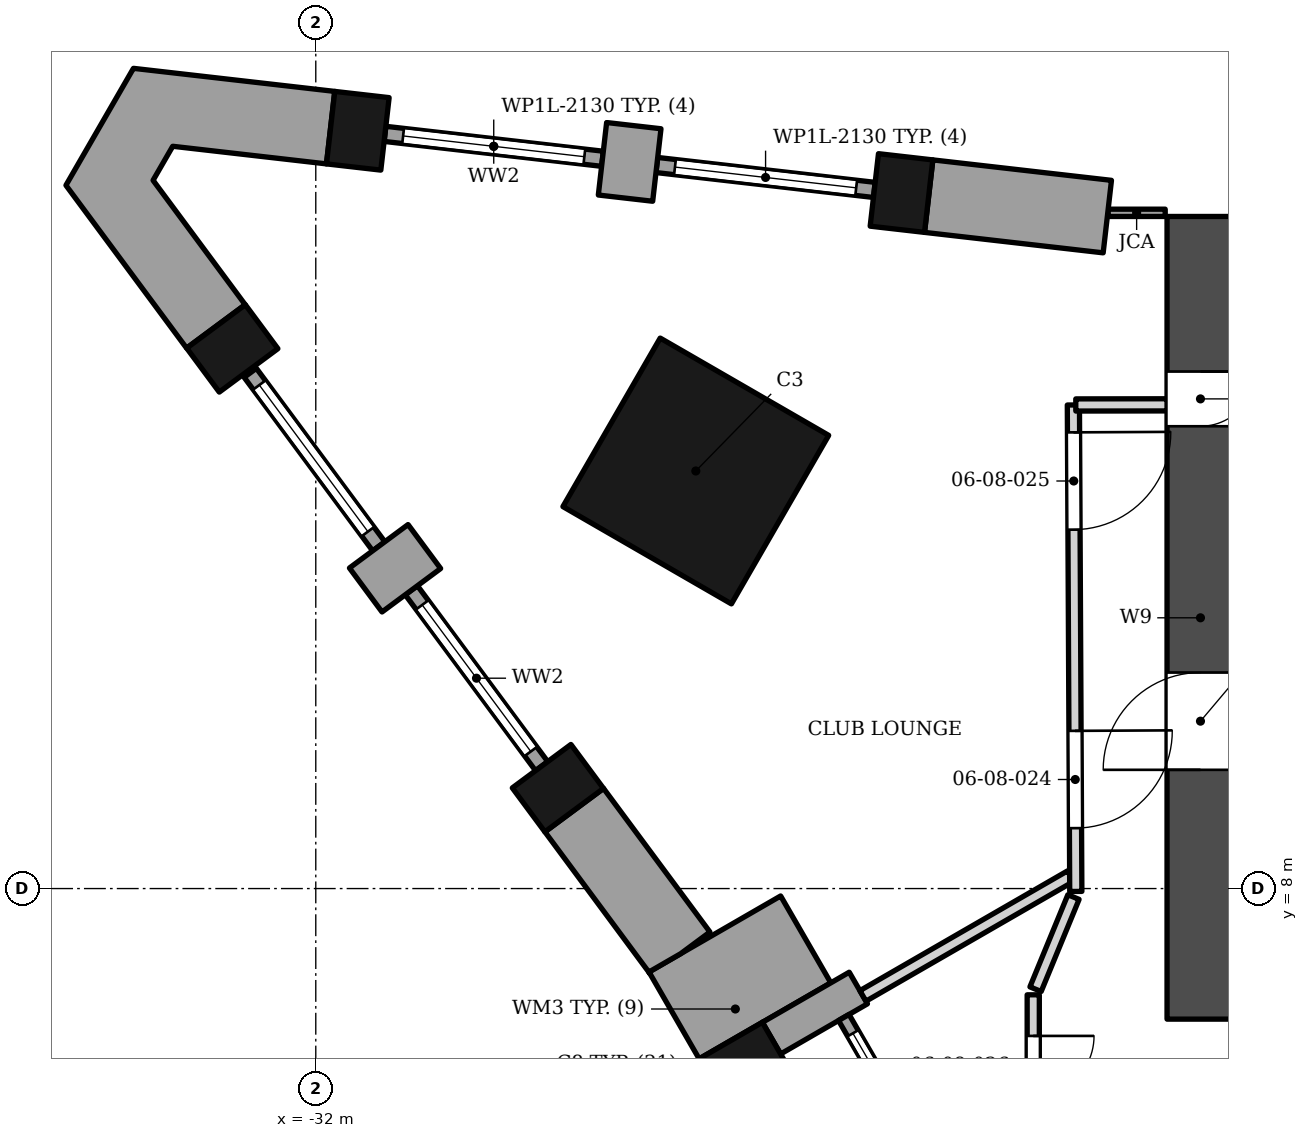
"""IFC4 building model, lengths in metres.
Left out: names, types, materials, properties, quantities, classifications, styles, units other than length and angle.
Written with IfcOpenShell. Run it as: python <this file> out.ifc"""

import sys

from ifc_helpers import new_model, si_unit, direction, frame, frame_2d, origin, origin_2d, place, context, subcontext, project, spatial, polyline, rectangle, outline, extrude, element, fill, save


model = new_model("IFC4")
c1 = context("Model", 3, precision=1e-05, world=origin(), true_north=direction((0.0, 1.0)))
c2 = subcontext(c1, "Body", "Model", "MODEL_VIEW")
j1 = project(units=[si_unit("LENGTHUNIT", "METRE"), si_unit("PLANEANGLEUNIT", "RADIAN")], contexts=[c1])
p1 = place(None, origin())
s1 = spatial("IfcSite", under=j1, at=p1, CompositionType="ELEMENT")
p2 = place(p1, origin())
s2 = spatial("IfcBuilding", under=s1, at=p2, CompositionType="ELEMENT")
p3 = place(p2, frame((0.0, 0.0, 46.0)))
s3 = spatial("IfcBuildingStorey", under=s2, at=p3, CompositionType="ELEMENT", Elevation=46.0)
p4 = place(p3, frame((-17.45, 5.853, 0.0), z_axis=(0.0, 0.0, 1.0), x_axis=(0.0, 1.0, 0.0)))
e1 = element("IfcWall", 1, at=p4, inside=s3, PredefinedType="SHEAR", context=c2, shape_type="SweptSolid", body=[
    extrude(rectangle(XDim=13.2, YDim=1.1, at=frame_2d((6.6, 0.0))), origin(), (0.0, 0.0, 1.0), 3.4),
])
p5 = place(p4, frame((4.1, 0.0, 0.0)))
e2 = element("IfcOpeningElement", 2, at=p5, cuts=e1, PredefinedType="OPENING", context=c2, shape_type="SweptSolid", body=[
    extrude(rectangle(XDim=1.6, YDim=2.1, at=frame_2d((0.8, 1.05))), frame((0.0, 0.56, 0.0), z_axis=(0.0, -1.0, 0.0), x_axis=(1.0, 0.0, 0.0)), (0.0, 0.0, 1.0), 1.12),
])
p6 = place(p4, frame((9.75, 0.0, 0.0)))
e3 = element("IfcOpeningElement", 3, at=p6, cuts=e1, PredefinedType="OPENING", context=c2, shape_type="SweptSolid", body=[
    extrude(rectangle(XDim=0.9, YDim=2.1, at=frame_2d((0.45, 1.05))), frame((0.0, 0.56, 0.0), z_axis=(0.0, -1.0, 0.0), x_axis=(1.0, 0.0, 0.0)), (0.0, 0.0, 1.0), 1.12),
])
p7 = place(p3, frame((-25.75, 14.867, 0.0), z_axis=(0.0, 0.0, 1.0), x_axis=(0.866025386331, -0.50000003023, 0.0)))
e4 = element("IfcColumn", 4, at=p7, inside=s3, PredefinedType="COLUMN", context=c2, shape_type="SweptSolid", body=[
    extrude(rectangle(XDim=3.2, YDim=3.2, at=origin_2d()), origin(), (0.0, 0.0, 1.0), 3.4),
])
for number, where, z_axis, x_axis in (
    (5, (-24.95, 5.11, 0.0), (0.0, 0.0, 1.0), (0.5, -0.866, 0.0)),
    (6, (-22.367, 19.438, 0.0), (0.0, 0.0, 1.0), (-0.994, 0.114, 0.0)),
    (7, (-31.309, 20.462, 0.0), (0.0, 0.0, 1.0), (-0.994, 0.114, 0.0)),
    (8, (-33.373, 16.883, 0.0), (0.0, 0.0, 1.0), (0.595, -0.804, 0.0)),
    (9, (-28.018, 9.651, 0.0), (0.0, 0.0, 1.0), (0.595, -0.804, 0.0)),
):
    element("IfcColumn", number, at=place(p3, frame(where, z_axis=z_axis, x_axis=x_axis)), inside=s3, PredefinedType="COLUMN", context=c2, shape_type="SweptSolid", body=[
        extrude(rectangle(XDim=0.9, YDim=1.2, at=origin_2d()), origin(), (0.0, 0.0, 1.0), 3.4),
    ])
p8 = place(p3, frame((-24.505, 5.54, 0.0), z_axis=(0.0, 0.0, 1.0), x_axis=(0.866003217194, 0.500038426333, 0.0)))
e10 = element("IfcWall", 10, at=p8, inside=s3, PredefinedType="SOLIDWALL", context=c2, shape_type="SweptSolid", body=[
    extrude(rectangle(XDim=1.65, YDim=0.6, at=frame_2d((0.825, 0.0))), origin(), (0.0, 0.0, 1.0), 2.45),
])
p9 = place(p3, frame((-23.316, 5.88, 0.0), z_axis=(0.0, 0.0, 1.0), x_axis=(0.500027713859, -0.866009402589, 0.0)))
e11 = element("IfcWall", 11, at=p9, inside=s3, PredefinedType="ELEMENTEDWALL", context=c2, shape_type="SweptSolid", body=[
    extrude(rectangle(XDim=4.2, YDim=0.2, at=frame_2d((2.1, 0.0))), origin(), (0.0, 0.0, 1.0), 2.45),
])
p10 = place(p9, frame((0.3, 0.0, 0.6)))
e12 = element("IfcOpeningElement", 12, at=p10, cuts=e11, PredefinedType="OPENING", context=c2, shape_type="SweptSolid", body=[
    extrude(rectangle(XDim=2.1, YDim=1.75, at=frame_2d((1.05, 0.875))), frame((0.0, 0.11, 0.0), z_axis=(0.0, -1.0, 0.0), x_axis=(1.0, 0.0, 0.0)), (0.0, 0.0, 1.0), 0.22),
])
p11 = place(p9, frame((2.7, 0.0, 0.0)))
e13 = element("IfcOpeningElement", 13, at=p11, cuts=e11, PredefinedType="OPENING", context=c2, shape_type="SweptSolid", body=[
    extrude(rectangle(XDim=1.2, YDim=2.35, at=frame_2d((0.6, 1.175))), frame((0.0, 0.11, 0.0), z_axis=(0.0, -1.0, 0.0), x_axis=(1.0, 0.0, 0.0)), (0.0, 0.0, 1.0), 0.22),
])
p12 = place(p3, origin())
e14 = element("IfcWall", 14, at=p12, inside=s3, PredefinedType="SOLIDWALL", context=c2, shape_type="SweptSolid", body=[
    extrude(outline(polyline([(-25.695, 5.2), (-24.655, 5.8), (-24.655, 5.799), (-23.53, 6.449), (-24.354, 7.878), (-26.52, 6.628), (-25.695, 5.199), (-25.694, 5.199), (-25.695, 5.2)])), origin(), (0.0, 0.0, 1.0), 2.63),
])
p13 = place(p3, frame((-26.906, 19.354, 0.0), z_axis=(0.0, 0.0, 1.0), x_axis=(0.113936776845, 0.993488002385, 0.0)))
e15 = element("IfcWall", 15, at=p13, inside=s3, PredefinedType="SOLIDWALL", context=c2, shape_type="SweptSolid", body=[
    extrude(rectangle(XDim=1.2, YDim=0.9, at=frame_2d((0.6, 0.0))), origin(), (0.0, 0.0, 1.0), 2.63),
])
p14 = place(p3, frame((-22.814, 19.489, 0.0), z_axis=(0.0, 0.0, 1.0), x_axis=(-0.993504225498, 0.113795228013, 0.0)))
e16 = element("IfcWall", 16, at=p14, inside=s3, PredefinedType="ELEMENTEDWALL", context=c2, shape_type="SweptSolid", body=[
    extrude(rectangle(XDim=3.6, YDim=0.25, at=frame_2d((1.8, 0.0))), origin(), (0.0, 0.0, 1.0), 2.63),
])
p15 = place(p14, frame((0.3, 0.0, 0.3)))
e17 = element("IfcOpeningElement", 17, at=p15, cuts=e16, PredefinedType="OPENING", context=c2, shape_type="SweptSolid", body=[
    extrude(rectangle(XDim=3.0, YDim=2.13, at=frame_2d((1.5, 1.065))), frame((0.0, 0.135, 0.0), z_axis=(0.0, -1.0, 0.0), x_axis=(1.0, 0.0, 0.0)), (0.0, 0.0, 1.0), 0.27),
])
p16 = place(p3, frame((-27.285, 20.001, 0.0), z_axis=(0.0, 0.0, 1.0), x_axis=(-0.993511890309, 0.113728289423, 0.0)))
e18 = element("IfcWall", 18, at=p16, inside=s3, PredefinedType="ELEMENTEDWALL", context=c2, shape_type="SweptSolid", body=[
    extrude(rectangle(XDim=3.6, YDim=0.25, at=frame_2d((1.8, 0.0))), origin(), (0.0, 0.0, 1.0), 2.63),
])
p17 = place(p16, frame((0.3, 0.0, 0.3)))
e19 = element("IfcOpeningElement", 19, at=p17, cuts=e18, PredefinedType="OPENING", context=c2, shape_type="SweptSolid", body=[
    extrude(rectangle(XDim=3.0, YDim=2.13, at=frame_2d((1.5, 1.065))), frame((0.0, 0.135, 0.0), z_axis=(0.0, -1.0, 0.0), x_axis=(1.0, 0.0, 0.0)), (0.0, 0.0, 1.0), 0.27),
])
p18 = place(p3, frame((-31.178, 12.91, 0.0), z_axis=(0.0, 0.0, 1.0), x_axis=(0.803549985832, 0.595237280644, 0.0)))
e20 = element("IfcWall", 20, at=p18, inside=s3, PredefinedType="SOLIDWALL", context=c2, shape_type="SweptSolid", body=[
    extrude(rectangle(XDim=1.2, YDim=0.9, at=frame_2d((0.6, 0.0))), origin(), (0.0, 0.0, 1.0), 2.63),
])
p19 = place(p3, frame((-33.077, 16.481, 0.0), z_axis=(0.0, 0.0, 1.0), x_axis=(0.595304805086, -0.803499962067, 0.0)))
e21 = element("IfcWall", 21, at=p19, inside=s3, PredefinedType="ELEMENTEDWALL", context=c2, shape_type="SweptSolid", body=[
    extrude(rectangle(XDim=3.552, YDim=0.25, at=frame_2d((1.776, 0.0))), origin(), (0.0, 0.0, 1.0), 2.63),
])
p20 = place(p19, frame((0.25, 0.0, 0.3)))
e22 = element("IfcOpeningElement", 22, at=p20, cuts=e21, PredefinedType="OPENING", context=c2, shape_type="SweptSolid", body=[
    extrude(rectangle(XDim=3.0, YDim=2.13, at=frame_2d((1.5, 1.065))), frame((0.0, 0.135, 0.0), z_axis=(0.0, -1.0, 0.0), x_axis=(1.0, 0.0, 0.0)), (0.0, 0.0, 1.0), 0.27),
])
p21 = place(p3, frame((-30.428, 12.906, 0.0), z_axis=(0.0, 0.0, 1.0), x_axis=(0.595302153335, -0.803501926715, 0.0)))
e23 = element("IfcWall", 23, at=p21, inside=s3, PredefinedType="ELEMENTEDWALL", context=c2, shape_type="SweptSolid", body=[
    extrude(rectangle(XDim=3.6, YDim=0.25, at=frame_2d((1.8, 0.0))), origin(), (0.0, 0.0, 1.0), 2.63),
])
p22 = place(p21, frame((0.3, 0.0, 0.3)))
e24 = element("IfcOpeningElement", 24, at=p22, cuts=e23, PredefinedType="OPENING", context=c2, shape_type="SweptSolid", body=[
    extrude(rectangle(XDim=3.0, YDim=2.13, at=frame_2d((1.5, 1.065))), frame((0.0, 0.135, 0.0), z_axis=(0.0, -1.0, 0.0), x_axis=(1.0, 0.0, 0.0)), (0.0, 0.0, 1.0), 0.27),
])
p23 = place(p3, frame((-21.92, 19.387, 0.0), z_axis=(0.0, 0.0, 1.0), x_axis=(0.993507634887, -0.113765457942, 0.0)))
e25 = element("IfcWall", 25, at=p23, inside=s3, PredefinedType="SOLIDWALL", context=c2, shape_type="SweptSolid", body=[
    extrude(rectangle(XDim=2.957, YDim=1.2, at=frame_2d((1.479, 0.0))), origin(), (0.0, 0.0, 1.0), 2.65),
])
p24 = place(p3, origin())
e26 = element("IfcWall", 26, at=p24, inside=s3, PredefinedType="SOLIDWALL", context=c2, shape_type="SweptSolid", body=[
    extrude(outline(polyline([(-31.688, 21.109), (-34.999, 21.489), (-36.109, 19.565), (-34.125, 16.887), (-33.161, 17.602), (-34.676, 19.647), (-34.353, 20.207), (-31.824, 19.917), (-31.688, 21.109)])), origin(), (0.0, 0.0, 1.0), 2.65),
])
p25 = place(p3, origin())
e27 = element("IfcWall", 27, at=p25, inside=s3, PredefinedType="SOLIDWALL", context=c2, shape_type="SweptSolid", body=[
    extrude(outline(polyline([(-25.518, 7.285), (-27.268, 9.647), (-27.268, 9.647), (-27.268, 9.646), (-28.232, 8.933), (-26.502, 6.599), (-26.52, 6.628), (-26.0, 6.928), (-25.518, 7.285)])), origin(), (0.0, 0.0, 1.0), 2.63),
])
p26 = place(p3, frame((-18.97, 19.113, 0.0), z_axis=(0.0, 0.0, 1.0), x_axis=(1.0, 0.0, 0.0)))
e28 = element("IfcWall", 28, at=p26, inside=s3, PredefinedType="SOLIDWALL", context=c2, shape_type="SweptSolid", body=[
    extrude(rectangle(XDim=0.94, YDim=0.12, at=frame_2d((0.47, 0.0))), origin(), (0.0, 0.0, 1.0), 2.65),
])
p27 = place(p3, frame((-23.001, 6.234, 0.0), z_axis=(0.0, 0.0, 1.0), x_axis=(0.866230957978, 0.499643800562, 0.0)))
e29 = element("IfcWall", 29, at=p27, inside=s3, PredefinedType="PARTITIONING", context=c2, shape_type="SweptSolid", body=[
    extrude(rectangle(XDim=3.941, YDim=0.2, at=frame_2d((1.971, 0.0))), origin(), (0.0, 0.0, 1.0), 2.552),
])
p28 = place(p3, frame((-20.2, 6.253, 0.0), z_axis=(0.0, 0.0, 1.0), x_axis=(0.000103755965, -0.999999994617, 0.0)))
e30 = element("IfcWall", 30, at=p28, inside=s3, PredefinedType="PARTITIONING", context=c2, shape_type="SweptSolid", body=[
    extrude(rectangle(XDim=2.353, YDim=0.2, at=frame_2d((1.177, 0.0))), origin(), (0.0, 0.0, 1.0), 2.45),
])
p29 = place(p28, frame((0.676, 0.0, 0.0)))
e31 = element("IfcOpeningElement", 31, at=p29, cuts=e30, PredefinedType="OPENING", context=c2, shape_type="SweptSolid", body=[
    extrude(rectangle(XDim=1.0, YDim=2.1, at=frame_2d((0.5, 1.05))), frame((0.0, 0.11, 0.0), z_axis=(0.0, -1.0, 0.0), x_axis=(1.0, 0.0, 0.0)), (0.0, 0.0, 1.0), 0.22),
])
p30 = place(p3, frame((-20.162, 6.345, 0.0), z_axis=(0.0, 0.0, 1.0), x_axis=(0.380749805254, 0.924678098475, 0.0)))
e32 = element("IfcWall", 32, at=p30, inside=s3, PredefinedType="PARTITIONING", context=c2, shape_type="SweptSolid", body=[
    extrude(rectangle(XDim=1.638, YDim=0.2, at=frame_2d((0.819, 0.0))), origin(), (0.0, 0.0, 1.0), 3.23),
])
p31 = place(p3, frame((-19.54, 15.952, 0.0), z_axis=(0.0, 0.0, 1.0), x_axis=(0.004974455496, -0.99998762732, 0.0)))
e33 = element("IfcWall", 33, at=p31, inside=s3, PredefinedType="PARTITIONING", context=c2, shape_type="SweptSolid", body=[
    extrude(rectangle(XDim=8.0, YDim=0.2, at=frame_2d((4.0, 0.0))), origin(), (0.0, 0.0, 1.0), 3.23),
])
p32 = place(p31, frame((5.359, 0.0, 0.0)))
e34 = element("IfcOpeningElement", 34, at=p32, cuts=e33, PredefinedType="OPENING", context=c2, shape_type="SweptSolid", body=[
    extrude(rectangle(XDim=1.6, YDim=2.1, at=frame_2d((0.8, 1.05))), frame((0.0, 0.11, 0.0), z_axis=(0.0, -1.0, 0.0), x_axis=(1.0, 0.0, 0.0)), (0.0, 0.0, 1.0), 0.22),
])
p33 = place(p31, frame((0.45, 0.0, 0.0)))
e35 = element("IfcOpeningElement", 35, at=p33, cuts=e33, PredefinedType="OPENING", context=c2, shape_type="SweptSolid", body=[
    extrude(rectangle(XDim=1.6, YDim=2.1, at=frame_2d((0.8, 1.05))), frame((0.0, 0.11, 0.0), z_axis=(0.0, -1.0, 0.0), x_axis=(1.0, 0.0, 0.0)), (0.0, 0.0, 1.0), 0.22),
])
p34 = place(p3, frame((-19.5, 15.953, 0.0), z_axis=(0.0, 0.0, 1.0), x_axis=(0.999999152842, 0.001301658513, 0.0)))
e36 = element("IfcWall", 36, at=p34, inside=s3, PredefinedType="PARTITIONING", context=c2, shape_type="SweptSolid", body=[
    extrude(rectangle(XDim=1.5, YDim=0.2, at=frame_2d((0.75, 0.0))), origin(), (0.0, 0.0, 1.0), 3.23),
])
p35 = place(p10, origin())
e37 = element("IfcWindow", 37, at=p35, inside=s3, PartitioningType="SINGLE_PANEL", PredefinedType="WINDOW", context=c2, shape_type="SweptSolid", body=[
    extrude(rectangle(XDim=2.1, YDim=1.75, at=frame_2d((1.05, 0.875))), frame((0.0, 0.03, 0.0), z_axis=(0.0, -1.0, 0.0), x_axis=(1.0, 0.0, 0.0)), (0.0, 0.0, 1.0), 0.06),
])
fill(e12, e37)
p36 = place(p15, origin())
e38 = element("IfcWindow", 38, at=p36, inside=s3, PartitioningType="SINGLE_PANEL", PredefinedType="WINDOW", context=c2, shape_type="SweptSolid", body=[
    extrude(rectangle(XDim=3.0, YDim=2.13, at=frame_2d((1.5, 1.065))), frame((0.0, 0.03, 0.0), z_axis=(0.0, -1.0, 0.0), x_axis=(1.0, 0.0, 0.0)), (0.0, 0.0, 1.0), 0.06),
])
fill(e17, e38)
p37 = place(p17, origin())
e39 = element("IfcWindow", 39, at=p37, inside=s3, PartitioningType="SINGLE_PANEL", PredefinedType="WINDOW", context=c2, shape_type="SweptSolid", body=[
    extrude(rectangle(XDim=3.0, YDim=2.13, at=frame_2d((1.5, 1.065))), frame((0.0, 0.03, 0.0), z_axis=(0.0, -1.0, 0.0), x_axis=(1.0, 0.0, 0.0)), (0.0, 0.0, 1.0), 0.06),
])
fill(e19, e39)
p38 = place(p20, origin())
e40 = element("IfcWindow", 40, at=p38, inside=s3, PartitioningType="SINGLE_PANEL", PredefinedType="WINDOW", context=c2, shape_type="SweptSolid", body=[
    extrude(rectangle(XDim=3.0, YDim=2.13, at=frame_2d((1.5, 1.065))), frame((0.0, 0.03, 0.0), z_axis=(0.0, -1.0, 0.0), x_axis=(1.0, 0.0, 0.0)), (0.0, 0.0, 1.0), 0.06),
])
fill(e22, e40)
p39 = place(p22, origin())
e41 = element("IfcWindow", 41, at=p39, inside=s3, PartitioningType="SINGLE_PANEL", PredefinedType="WINDOW", context=c2, shape_type="SweptSolid", body=[
    extrude(rectangle(XDim=3.0, YDim=2.13, at=frame_2d((1.5, 1.065))), frame((0.0, 0.03, 0.0), z_axis=(0.0, -1.0, 0.0), x_axis=(1.0, 0.0, 0.0)), (0.0, 0.0, 1.0), 0.06),
])
fill(e24, e41)
p40 = place(p5, origin())
e42 = element("IfcDoor", 42, at=p40, inside=s3, OperationType="DOUBLE_DOOR_SINGLE_SWING", PredefinedType="DOOR", context=c2, shape_type="SweptSolid", body=[
    extrude(rectangle(XDim=1.6, YDim=2.1, at=frame_2d((0.8, 1.05))), frame((0.0, -0.225, 0.0), z_axis=(0.0, -1.0, 0.0), x_axis=(1.0, 0.0, 0.0)), (0.0, 0.0, 1.0), 0.05),
])
fill(e2, e42)
p41 = place(p6, origin())
e43 = element("IfcDoor", 43, at=p41, inside=s3, OperationType="SINGLE_SWING_RIGHT", PredefinedType="DOOR", context=c2, shape_type="SweptSolid", body=[
    extrude(rectangle(XDim=0.9, YDim=2.1, at=frame_2d((0.45, 1.05))), frame((0.0, -0.225, 0.0), z_axis=(0.0, -1.0, 0.0), x_axis=(1.0, 0.0, 0.0)), (0.0, 0.0, 1.0), 0.05),
])
fill(e3, e43)
p42 = place(p32, origin())
e44 = element("IfcDoor", 44, at=p42, inside=s3, OperationType="DOUBLE_DOOR_SINGLE_SWING", PredefinedType="DOOR", context=c2, shape_type="SweptSolid", body=[
    extrude(rectangle(XDim=1.6, YDim=2.1, at=frame_2d((0.8, 1.05))), frame((0.0, 0.025, 0.0), z_axis=(0.0, -1.0, 0.0), x_axis=(1.0, 0.0, 0.0)), (0.0, 0.0, 1.0), 0.05),
])
fill(e34, e44)
p43 = place(p33, origin())
e45 = element("IfcDoor", 45, at=p43, inside=s3, OperationType="DOUBLE_DOOR_SINGLE_SWING", PredefinedType="DOOR", context=c2, shape_type="SweptSolid", body=[
    extrude(rectangle(XDim=1.6, YDim=2.1, at=frame_2d((0.8, 1.05))), frame((0.0, 0.025, 0.0), z_axis=(0.0, -1.0, 0.0), x_axis=(1.0, 0.0, 0.0)), (0.0, 0.0, 1.0), 0.05),
])
fill(e35, e45)
p44 = place(p29, origin())
e46 = element("IfcDoor", 46, at=p44, inside=s3, OperationType="SINGLE_SWING_LEFT", PredefinedType="DOOR", context=c2, shape_type="SweptSolid", body=[
    extrude(rectangle(XDim=1.0, YDim=2.1, at=frame_2d((0.5, 1.05))), frame((0.0, 0.025, 0.0), z_axis=(0.0, -1.0, 0.0), x_axis=(1.0, 0.0, 0.0)), (0.0, 0.0, 1.0), 0.05),
])
fill(e31, e46)
save(model, sys.argv[1])
